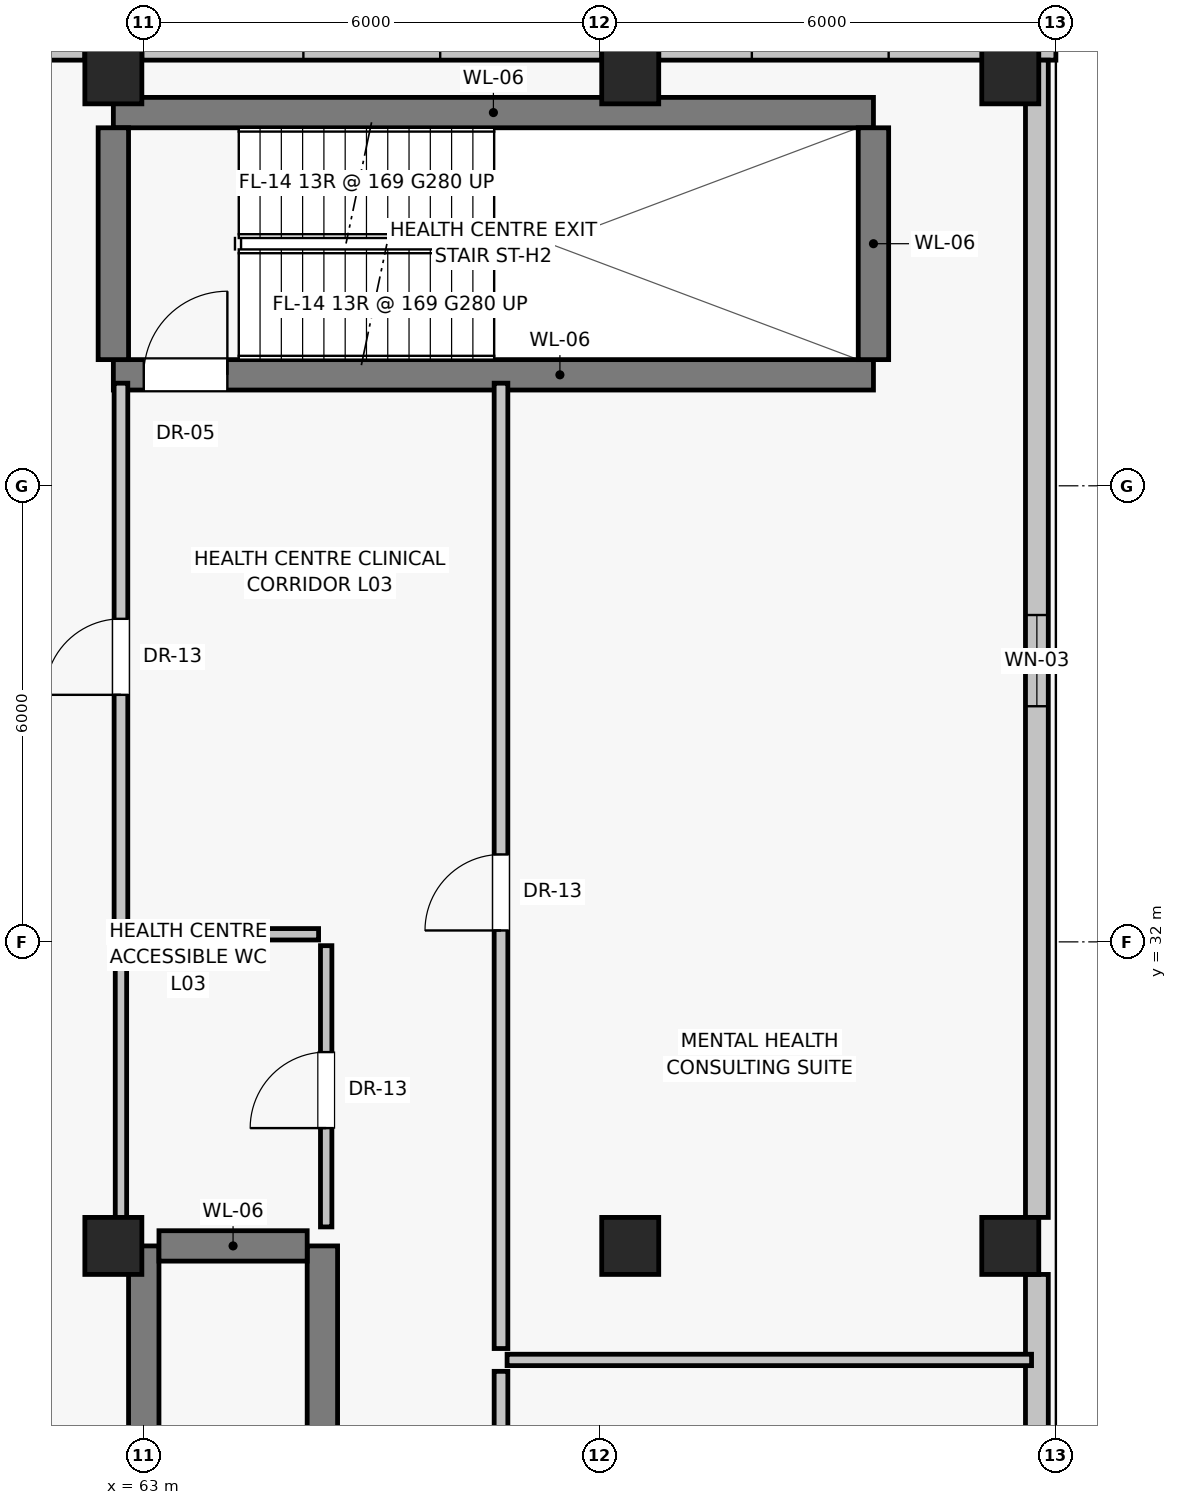
"""IFC4 building model, lengths in metres.
Left out: names, types, materials, properties, quantities, classifications, styles, units other than length and angle.
Written with IfcOpenShell. Run it as: python <this file> out.ifc"""

import sys

from ifc_helpers import new_model, si_unit, direction, frame, frame_2d, origin, origin_2d, place, context, subcontext, project, spatial, rectangle, extrude, source, transform, mapped, element, fill, save


model = new_model("IFC4")
c1 = context("Model", 3, precision=1e-05, world=origin(), true_north=direction((0.0, 1.0)))
c2 = subcontext(c1, "Body", "Model", "MODEL_VIEW")
j1 = project(units=[si_unit("LENGTHUNIT", "METRE"), si_unit("PLANEANGLEUNIT", "RADIAN")], contexts=[c1])
p1 = place(None, origin())
s1 = spatial("IfcSite", under=j1, at=p1, CompositionType="ELEMENT")
p2 = place(p1, origin())
s2 = spatial("IfcBuilding", under=s1, at=p2, CompositionType="ELEMENT")
p3 = place(p2, frame((0.0, 0.0, 14.0)))
s3 = spatial("IfcBuildingStorey", under=s2, at=p3, CompositionType="ELEMENT", Elevation=14.0)
for number, where, z_axis, x_axis in (
    (1, (62.6, 28.0, 0.0), (0.0, 0.0, 1.0), (1.0, 0.0, 0.0)),
    (2, (62.6, 43.4, 0.0), (0.0, 0.0, 1.0), (1.0, 0.0, 0.0)),
    (3, (69.4, 28.0, 0.0), (0.0, 0.0, 1.0), (1.0, 0.0, 0.0)),
    (4, (69.4, 43.4, 0.0), (0.0, 0.0, 1.0), (1.0, 0.0, 0.0)),
    (5, (74.4, 28.0, 0.0), (0.0, 0.0, 1.0), (1.0, 0.0, 0.0)),
    (6, (74.4, 43.4, 0.0), (0.0, 0.0, 1.0), (1.0, 0.0, 0.0)),
):
    element("IfcColumn", number, at=place(p3, frame(where, z_axis=z_axis, x_axis=x_axis)), inside=s3, PredefinedType="COLUMN", context=c2, shape_type="SweptSolid", body=[
        extrude(rectangle(XDim=0.75, YDim=0.75, at=origin_2d()), origin(), (0.0, 0.0, 1.0), 4.4),
    ])
p4 = place(p3, frame((75.0, 43.75, 0.0), z_axis=(0.0, 0.0, 1.0), x_axis=(-1.0, 0.0, 0.0)))
e7 = element("IfcWall", 7, at=p4, inside=s3, PredefinedType="SOLIDWALL", context=c2, shape_type="SweptSolid", body=[
    extrude(rectangle(XDim=5.225, YDim=0.3, at=frame_2d((2.613, 0.0))), origin(), (0.0, 0.0, 1.0), 3.35),
])
p5 = place(p4, frame((2.2, 0.0, 0.85)))
e8 = element("IfcOpeningElement", 8, at=p5, cuts=e7, PredefinedType="OPENING", context=c2, shape_type="SweptSolid", body=[
    extrude(rectangle(XDim=1.8, YDim=1.65, at=frame_2d((0.9, 0.825))), frame((0.0, 0.16, 0.0), z_axis=(0.0, -1.0, 0.0), x_axis=(1.0, 0.0, 0.0)), (0.0, 0.0, 1.0), 0.32),
])
p6 = place(p3, frame((69.025, 43.75, 0.0), z_axis=(0.0, 0.0, 1.0), x_axis=(-1.0, 0.0, 0.0)))
e9 = element("IfcWall", 9, at=p6, inside=s3, PredefinedType="SOLIDWALL", context=c2, shape_type="SweptSolid", body=[
    extrude(rectangle(XDim=6.05, YDim=0.3, at=frame_2d((3.025, 0.0))), origin(), (0.0, 0.0, 1.0), 3.35),
])
p7 = place(p6, frame((2.125, 0.0, 0.85)))
e10 = element("IfcOpeningElement", 10, at=p7, cuts=e9, PredefinedType="OPENING", context=c2, shape_type="SweptSolid", body=[
    extrude(rectangle(XDim=1.8, YDim=1.65, at=frame_2d((0.9, 0.825))), frame((0.0, 0.16, 0.0), z_axis=(0.0, -1.0, 0.0), x_axis=(1.0, 0.0, 0.0)), (0.0, 0.0, 1.0), 0.32),
])
p8 = place(p3, frame((62.225, 43.75, 0.0), z_axis=(0.0, 0.0, 1.0), x_axis=(-1.0, 0.0, 0.0)))
e11 = element("IfcWall", 11, at=p8, inside=s3, PredefinedType="SOLIDWALL", context=c2, shape_type="SweptSolid", body=[
    extrude(rectangle(XDim=5.225, YDim=0.3, at=frame_2d((2.613, 0.0))), origin(), (0.0, 0.0, 1.0), 3.35),
])
p9 = place(p8, frame((1.225, 0.0, 0.85)))
e12 = element("IfcOpeningElement", 12, at=p9, cuts=e11, PredefinedType="OPENING", context=c2, shape_type="SweptSolid", body=[
    extrude(rectangle(XDim=1.8, YDim=1.65, at=frame_2d((0.9, 0.825))), frame((0.0, 0.16, 0.0), z_axis=(0.0, -1.0, 0.0), x_axis=(1.0, 0.0, 0.0)), (0.0, 0.0, 1.0), 0.32),
])
p10 = place(p3, frame((74.75, 16.375, 0.0), z_axis=(0.0, 0.0, 1.0), x_axis=(0.0, 1.0, 0.0)))
e13 = element("IfcWall", 13, at=p10, inside=s3, PredefinedType="SOLIDWALL", context=c2, shape_type="SweptSolid", body=[
    extrude(rectangle(XDim=11.25, YDim=0.3, at=frame_2d((5.625, 0.0))), origin(), (0.0, 0.0, 1.0), 3.35),
])
p11 = place(p10, frame((5.025, 0.0, 0.95)))
e14 = element("IfcOpeningElement", 14, at=p11, cuts=e13, PredefinedType="OPENING", context=c2, shape_type="SweptSolid", body=[
    extrude(rectangle(XDim=1.2, YDim=1.5, at=frame_2d((0.6, 0.75))), frame((0.0, 0.16, 0.0), z_axis=(0.0, -1.0, 0.0), x_axis=(1.0, 0.0, 0.0)), (0.0, 0.0, 1.0), 0.32),
])
p12 = place(p3, frame((74.75, 28.375, 0.0), z_axis=(0.0, 0.0, 1.0), x_axis=(0.0, 1.0, 0.0)))
e15 = element("IfcWall", 15, at=p12, inside=s3, PredefinedType="SOLIDWALL", context=c2, shape_type="SweptSolid", body=[
    extrude(rectangle(XDim=15.225, YDim=0.3, at=frame_2d((7.613, 0.0))), origin(), (0.0, 0.0, 1.0), 3.35),
])
p13 = place(p12, frame((6.725, 0.0, 0.95)))
e16 = element("IfcOpeningElement", 16, at=p13, cuts=e15, PredefinedType="OPENING", context=c2, shape_type="SweptSolid", body=[
    extrude(rectangle(XDim=1.2, YDim=1.5, at=frame_2d((0.6, 0.75))), frame((0.0, 0.16, 0.0), z_axis=(0.0, -1.0, 0.0), x_axis=(1.0, 0.0, 0.0)), (0.0, 0.0, 1.0), 0.32),
])
p14 = place(p3, frame((63.0, 16.0, 0.0), z_axis=(0.0, 0.0, 1.0), x_axis=(0.0, 1.0, 0.0)))
e17 = element("IfcWall", 17, at=p14, inside=s3, PredefinedType="SHEAR", context=c2, shape_type="SweptSolid", body=[
    extrude(rectangle(XDim=12.0, YDim=0.4, at=frame_2d((6.0, 0.0))), origin(), (0.0, 0.0, 1.0), 4.1),
])
p15 = place(p3, frame((65.35, 16.0, 0.0), z_axis=(0.0, 0.0, 1.0), x_axis=(0.0, 1.0, 0.0)))
e18 = element("IfcWall", 18, at=p15, inside=s3, PredefinedType="SHEAR", context=c2, shape_type="SweptSolid", body=[
    extrude(rectangle(XDim=12.0, YDim=0.4, at=frame_2d((6.0, 0.0))), origin(), (0.0, 0.0, 1.0), 4.1),
])
p16 = place(p15, frame((3.35, 0.0, 0.0)))
e19 = element("IfcOpeningElement", 19, at=p16, cuts=e18, PredefinedType="OPENING", context=c2, shape_type="SweptSolid", body=[
    extrude(rectangle(XDim=1.3, YDim=2.25, at=frame_2d((0.65, 1.125))), frame((0.0, 0.21, 0.0), z_axis=(0.0, -1.0, 0.0), x_axis=(1.0, 0.0, 0.0)), (0.0, 0.0, 1.0), 0.42),
])
p17 = place(p15, frame((7.35, 0.0, 0.0)))
e20 = element("IfcOpeningElement", 20, at=p17, cuts=e18, PredefinedType="OPENING", context=c2, shape_type="SweptSolid", body=[
    extrude(rectangle(XDim=1.3, YDim=2.25, at=frame_2d((0.65, 1.125))), frame((0.0, 0.21, 0.0), z_axis=(0.0, -1.0, 0.0), x_axis=(1.0, 0.0, 0.0)), (0.0, 0.0, 1.0), 0.42),
])
p18 = place(p3, frame((63.2, 28.0, 0.0), z_axis=(0.0, 0.0, 1.0), x_axis=(1.0, 0.0, 0.0)))
e21 = element("IfcWall", 21, at=p18, inside=s3, PredefinedType="SHEAR", context=c2, shape_type="SweptSolid", body=[
    extrude(rectangle(XDim=1.95, YDim=0.4, at=frame_2d((0.975, 0.0))), origin(), (0.0, 0.0, 1.0), 4.1),
])
p19 = place(p3, frame((62.6, 39.46, 0.0), z_axis=(0.0, 0.0, 1.0), x_axis=(1.0, 0.0, 0.0)))
e22 = element("IfcWall", 22, at=p19, inside=s3, PredefinedType="SHEAR", context=c2, shape_type="SweptSolid", body=[
    extrude(rectangle(XDim=10.0, YDim=0.4, at=frame_2d((5.0, 0.0))), origin(), (0.0, 0.0, 1.0), 4.1),
])
p20 = place(p19, frame((0.4, 0.0, 0.0)))
e23 = element("IfcOpeningElement", 23, at=p20, cuts=e22, PredefinedType="OPENING", context=c2, shape_type="SweptSolid", body=[
    extrude(rectangle(XDim=1.1, YDim=2.03, at=frame_2d((0.55, 1.015))), frame((0.0, 0.21, 0.0), z_axis=(0.0, -1.0, 0.0), x_axis=(1.0, 0.0, 0.0)), (0.0, 0.0, 1.0), 0.42),
])
p21 = place(p3, frame((62.6, 42.91, 0.0), z_axis=(0.0, 0.0, 1.0), x_axis=(1.0, 0.0, 0.0)))
e24 = element("IfcWall", 24, at=p21, inside=s3, PredefinedType="SHEAR", context=c2, shape_type="SweptSolid", body=[
    extrude(rectangle(XDim=10.0, YDim=0.4, at=frame_2d((5.0, 0.0))), origin(), (0.0, 0.0, 1.0), 4.1),
])
for number, where, z_axis, x_axis in (
    (25, (62.6, 39.66, 0.0), (0.0, 0.0, 1.0), (0.0, 1.0, 0.0)),
    (26, (72.6, 39.66, 0.0), (0.0, 0.0, 1.0), (0.0, 1.0, 0.0)),
):
    element("IfcWall", number, at=place(p3, frame(where, z_axis=z_axis, x_axis=x_axis)), inside=s3, PredefinedType="SHEAR", context=c2, shape_type="SweptSolid", body=[
        extrude(rectangle(XDim=3.05, YDim=0.4, at=frame_2d((1.525, 0.0))), origin(), (0.0, 0.0, 1.0), 4.1),
    ])
p22 = place(p3, frame((62.8, 32.1, 0.0), z_axis=(0.0, 0.0, 1.0), x_axis=(1.0, 0.0, 0.0)))
e27 = element("IfcWall", 27, at=p22, inside=s3, PredefinedType="PARTITIONING", context=c2, shape_type="SweptSolid", body=[
    extrude(rectangle(XDim=2.5, YDim=0.15, at=frame_2d((1.25, 0.0))), origin(), (0.0, 0.0, 1.0), 4.1),
])
p23 = place(p3, frame((62.7, 28.2, 0.0), z_axis=(0.0, 0.0, 1.0), x_axis=(0.0, 1.0, 0.0)))
e28 = element("IfcWall", 28, at=p23, inside=s3, PredefinedType="PARTITIONING", context=c2, shape_type="SweptSolid", body=[
    extrude(rectangle(XDim=3.8, YDim=0.15, at=frame_2d((1.9, 0.0))), origin(), (0.0, 0.0, 1.0), 3.5),
])
p24 = place(p3, frame((65.4, 28.25, 0.0), z_axis=(0.0, 0.0, 1.0), x_axis=(0.0, 1.0, 0.0)))
e29 = element("IfcWall", 29, at=p24, inside=s3, PredefinedType="PARTITIONING", context=c2, shape_type="SweptSolid", body=[
    extrude(rectangle(XDim=3.7, YDim=0.15, at=frame_2d((1.85, 0.0))), origin(), (0.0, 0.0, 1.0), 4.1),
])
p25 = place(p24, frame((1.3, 0.0, 0.0)))
e30 = element("IfcOpeningElement", 30, at=p25, cuts=e29, PredefinedType="OPENING", context=c2, shape_type="SweptSolid", body=[
    extrude(rectangle(XDim=1.0, YDim=2.01, at=frame_2d((0.5, 1.005))), frame((0.0, 0.085, 0.0), z_axis=(0.0, -1.0, 0.0), x_axis=(1.0, 0.0, 0.0)), (0.0, 0.0, 1.0), 0.17),
])
p26 = place(p3, frame((62.7, 32.25, 0.0), z_axis=(0.0, 0.0, 1.0), x_axis=(0.0, 1.0, 0.0)))
e31 = element("IfcWall", 31, at=p26, inside=s3, PredefinedType="PARTITIONING", context=c2, shape_type="SweptSolid", body=[
    extrude(rectangle(XDim=7.1, YDim=0.18, at=frame_2d((3.55, 0.0))), origin(), (0.0, 0.0, 1.0), 3.5),
])
p27 = place(p26, frame((3.0, 0.0, 0.0)))
e32 = element("IfcOpeningElement", 32, at=p27, cuts=e31, PredefinedType="OPENING", context=c2, shape_type="SweptSolid", body=[
    extrude(rectangle(XDim=1.0, YDim=2.01, at=frame_2d((0.5, 1.005))), frame((0.0, 0.1, 0.0), z_axis=(0.0, -1.0, 0.0), x_axis=(1.0, 0.0, 0.0)), (0.0, 0.0, 1.0), 0.2),
])
p28 = place(p3, frame((67.7, 8.65, 0.0), z_axis=(0.0, 0.0, 1.0), x_axis=(0.0, 1.0, 0.0)))
e33 = element("IfcWall", 33, at=p28, inside=s3, PredefinedType="PARTITIONING", context=c2, shape_type="SweptSolid", body=[
    extrude(rectangle(XDim=17.7, YDim=0.18, at=frame_2d((8.85, 0.0))), origin(), (0.0, 0.0, 1.0), 4.1),
])
p29 = place(p28, frame((5.5, 0.0, 0.0)))
e34 = element("IfcOpeningElement", 34, at=p29, cuts=e33, PredefinedType="OPENING", context=c2, shape_type="SweptSolid", body=[
    extrude(rectangle(XDim=1.0, YDim=2.01, at=frame_2d((0.5, 1.005))), frame((0.0, 0.1, 0.0), z_axis=(0.0, -1.0, 0.0), x_axis=(1.0, 0.0, 0.0)), (0.0, 0.0, 1.0), 0.2),
])
p30 = place(p3, frame((67.7, 26.65, 0.0), z_axis=(0.0, 0.0, 1.0), x_axis=(0.0, 1.0, 0.0)))
e35 = element("IfcWall", 35, at=p30, inside=s3, PredefinedType="PARTITIONING", context=c2, shape_type="SweptSolid", body=[
    extrude(rectangle(XDim=12.7, YDim=0.18, at=frame_2d((6.35, 0.0))), origin(), (0.0, 0.0, 1.0), 4.1),
])
p31 = place(p30, frame((5.5, 0.0, 0.0)))
e36 = element("IfcOpeningElement", 36, at=p31, cuts=e35, PredefinedType="OPENING", context=c2, shape_type="SweptSolid", body=[
    extrude(rectangle(XDim=1.0, YDim=2.01, at=frame_2d((0.5, 1.005))), frame((0.0, 0.1, 0.0), z_axis=(0.0, -1.0, 0.0), x_axis=(1.0, 0.0, 0.0)), (0.0, 0.0, 1.0), 0.2),
])
p32 = place(p3, frame((67.78, 26.5, 0.0), z_axis=(0.0, 0.0, 1.0), x_axis=(1.0, 0.0, 0.0)))
e37 = element("IfcWall", 37, at=p32, inside=s3, PredefinedType="PARTITIONING", context=c2, shape_type="SweptSolid", body=[
    extrude(rectangle(XDim=6.9, YDim=0.15, at=frame_2d((3.45, 0.0))), origin(), (0.0, 0.0, 1.0), 4.1),
])
m1 = source(origin(), c2, "Body", "SweptSolid", [
    extrude(rectangle(XDim=1.2, YDim=1.5, at=frame_2d((0.6, 0.75))), frame((0.0, 0.03, 0.0), z_axis=(0.0, -1.0, 0.0), x_axis=(1.0, 0.0, 0.0)), (0.0, 0.0, 1.0), 0.06),
])
p33 = place(p13, origin())
e38 = element("IfcWindow", 38, at=p33, inside=s3, PartitioningType="SINGLE_PANEL", PredefinedType="WINDOW", context=c2, shape_type="MappedRepresentation", body=[
    mapped(m1, transform((0.0, 0.0, 0.0), scale=1.0)),
])
fill(e16, e38)
m2 = source(origin(), c2, "Body", "SweptSolid", [
    extrude(rectangle(XDim=1.1, YDim=2.03, at=frame_2d((0.55, 1.015))), frame((0.0, 0.025, 0.0), z_axis=(0.0, -1.0, 0.0), x_axis=(1.0, 0.0, 0.0)), (0.0, 0.0, 1.0), 0.05),
])
p34 = place(p20, origin())
e39 = element("IfcDoor", 39, at=p34, inside=s3, OperationType="SINGLE_SWING_RIGHT", PredefinedType="DOOR", context=c2, shape_type="MappedRepresentation", body=[
    mapped(m2, transform((0.0, 0.0, 0.0), scale=1.0)),
])
fill(e23, e39)
m3 = source(origin(), c2, "Body", "SweptSolid", [
    extrude(rectangle(XDim=1.0, YDim=2.01, at=frame_2d((0.5, 1.005))), frame((0.0, 0.025, 0.0), z_axis=(0.0, -1.0, 0.0), x_axis=(1.0, 0.0, 0.0)), (0.0, 0.0, 1.0), 0.05),
])
p35 = place(p25, origin())
e40 = element("IfcDoor", 40, at=p35, inside=s3, OperationType="SINGLE_SWING_LEFT", PredefinedType="DOOR", context=c2, shape_type="MappedRepresentation", body=[
    mapped(m3, transform((0.0, 0.0, 0.0), scale=1.0)),
])
fill(e30, e40)
p36 = place(p27, origin())
e41 = element("IfcDoor", 41, at=p36, inside=s3, OperationType="SINGLE_SWING_LEFT", PredefinedType="DOOR", context=c2, shape_type="MappedRepresentation", body=[
    mapped(m3, transform((0.0, 0.0, 0.0), scale=1.0)),
])
fill(e32, e41)
p37 = place(p31, origin())
e42 = element("IfcDoor", 42, at=p37, inside=s3, OperationType="SINGLE_SWING_LEFT", PredefinedType="DOOR", context=c2, shape_type="MappedRepresentation", body=[
    mapped(m3, transform((0.0, 0.0, 0.0), scale=1.0)),
])
fill(e36, e42)
save(model, sys.argv[1])
